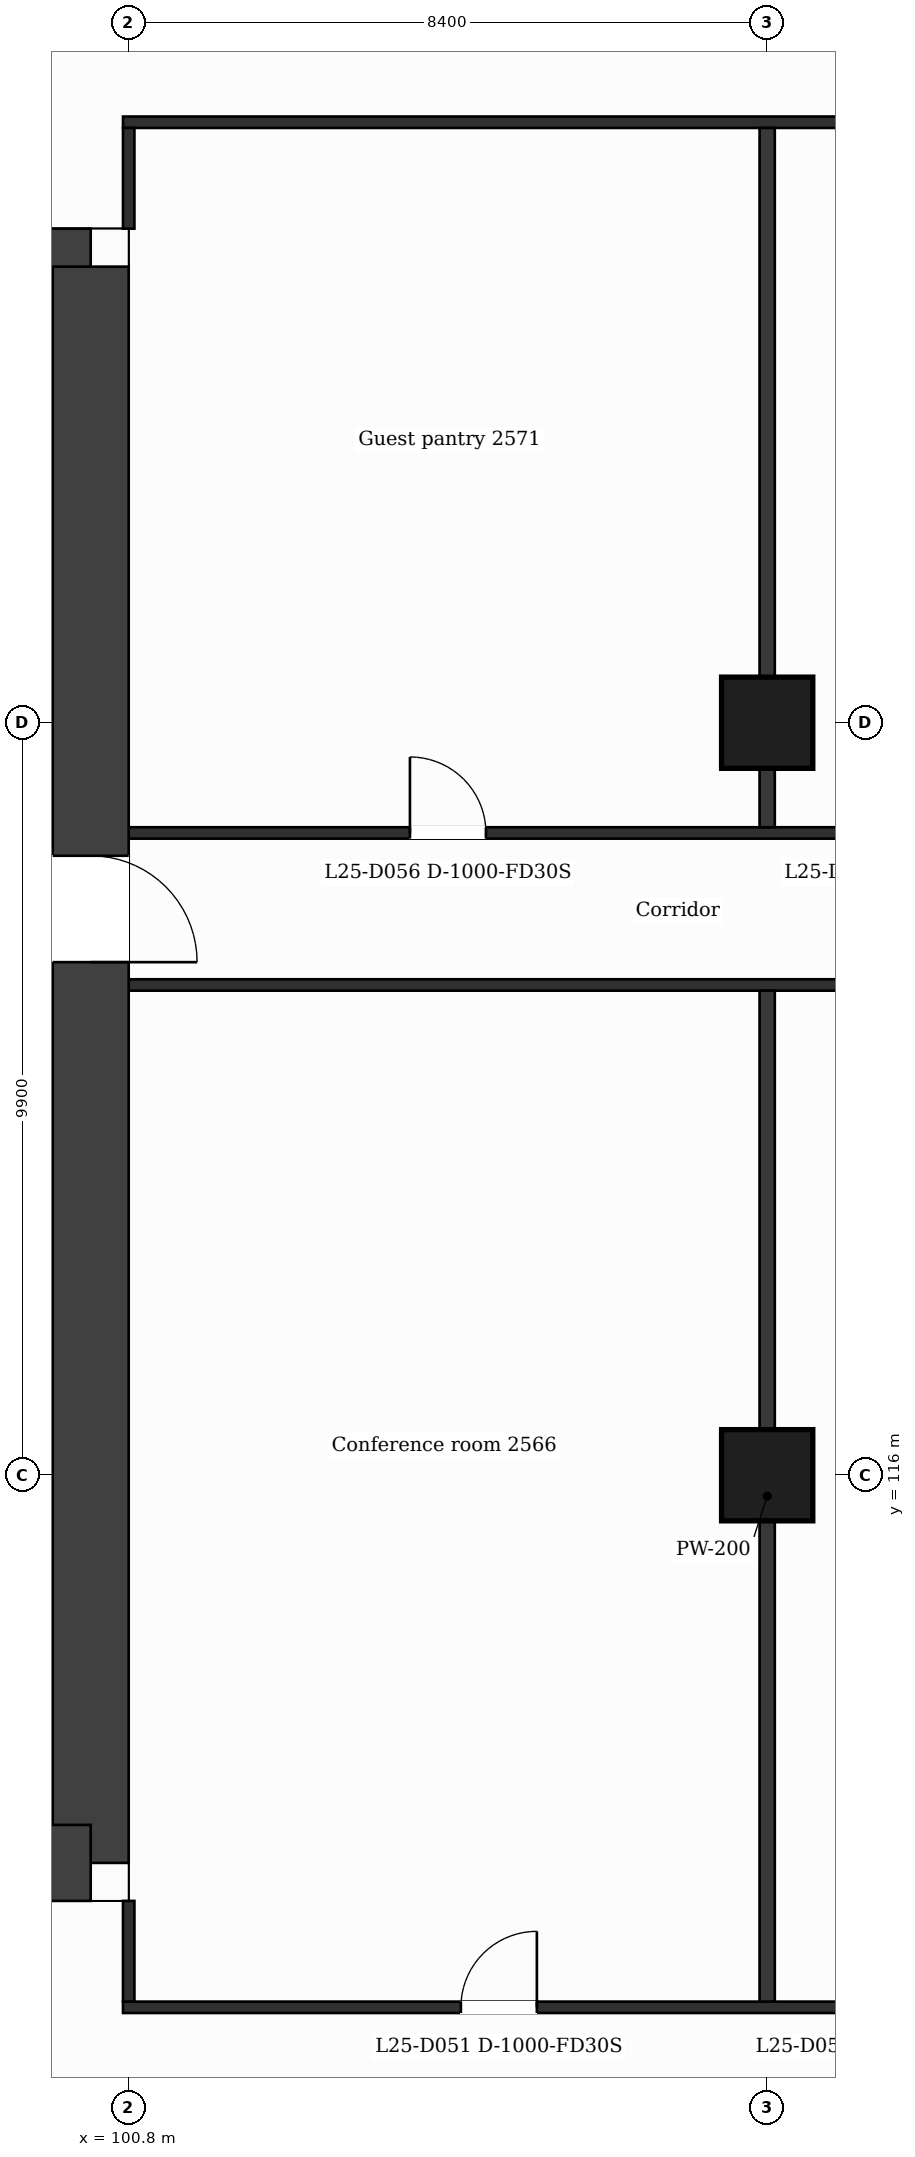
"""IFC4 building model, lengths in metres.
Left out: names, types, materials, properties, quantities, classifications, styles, units other than length and angle.
Written with IfcOpenShell. Run it as: python <this file> out.ifc"""

import sys

from ifc_helpers import new_model, si_unit, direction, frame, frame_2d, origin, origin_2d, place, context, subcontext, project, spatial, rectangle, extrude, element, fill, save


model = new_model("IFC4")
c1 = context("Model", 3, precision=1e-05, world=origin(), true_north=direction((0.0, 1.0)))
c2 = subcontext(c1, "Body", "Model", "MODEL_VIEW")
j1 = project(units=[si_unit("LENGTHUNIT", "METRE"), si_unit("PLANEANGLEUNIT", "RADIAN")], contexts=[c1])
p1 = place(None, origin())
s1 = spatial("IfcSite", under=j1, at=p1, CompositionType="ELEMENT")
p2 = place(p1, origin())
s2 = spatial("IfcBuilding", under=s1, at=p2, CompositionType="ELEMENT")
p3 = place(p2, frame((0.0, 0.0, 109.5)))
s3 = spatial("IfcBuildingStorey", under=s2, at=p3, CompositionType="ELEMENT", Elevation=109.5)
p4 = place(p3, frame((89.068, 131.9, 0.0), z_axis=(0.0, 0.0, 1.0), x_axis=(1.0, 0.0, 0.0)))
e1 = element("IfcWall", 1, at=p4, inside=s3, PredefinedType="SHEAR", context=c2, shape_type="SweptSolid", body=[
    extrude(rectangle(XDim=11.232, YDim=1.0, at=frame_2d((5.616, 0.0))), origin(), (0.0, 0.0, 1.0), 3.7),
])
p5 = place(p4, frame((6.646, 0.0, 0.0)))
e2 = element("IfcOpeningElement", 2, at=p5, cuts=e1, PredefinedType="OPENING", context=c2, shape_type="SweptSolid", body=[
    extrude(rectangle(XDim=1.2, YDim=2.1, at=frame_2d((0.6, 1.05))), frame((0.0, 0.51, 0.0), z_axis=(0.0, -1.0, 0.0), x_axis=(1.0, 0.0, 0.0)), (0.0, 0.0, 1.0), 1.02),
])
p6 = place(p3, frame((100.3, 131.9, 0.0), z_axis=(0.0, 0.0, 1.0), x_axis=(0.0, -1.0, 0.0)))
e3 = element("IfcWall", 3, at=p6, inside=s3, PredefinedType="SHEAR", context=c2, shape_type="SweptSolid", body=[
    extrude(rectangle(XDim=21.0, YDim=1.0, at=frame_2d((10.5, 0.0))), origin(), (0.0, 0.0, 1.0), 3.7),
])
p7 = place(p6, frame((7.75, 0.0, 0.0)))
e4 = element("IfcOpeningElement", 4, at=p7, cuts=e3, PredefinedType="OPENING", context=c2, shape_type="SweptSolid", body=[
    extrude(rectangle(XDim=1.4, YDim=2.1, at=frame_2d((0.7, 1.05))), frame((0.0, 0.51, 0.0), z_axis=(0.0, -1.0, 0.0), x_axis=(1.0, 0.0, 0.0)), (0.0, 0.0, 1.0), 1.02),
])
p8 = place(p3, frame((100.3, 110.9, 0.0), z_axis=(0.0, 0.0, 1.0), x_axis=(-1.0, 0.0, 0.0)))
e5 = element("IfcWall", 5, at=p8, inside=s3, PredefinedType="SHEAR", context=c2, shape_type="SweptSolid", body=[
    extrude(rectangle(XDim=14.059, YDim=1.0, at=frame_2d((7.03, 0.0))), origin(), (0.0, 0.0, 1.0), 3.7),
])
p9 = place(p8, frame((5.802, 0.0, 0.0)))
e6 = element("IfcOpeningElement", 6, at=p9, cuts=e5, PredefinedType="OPENING", context=c2, shape_type="SweptSolid", body=[
    extrude(rectangle(XDim=1.4, YDim=2.1, at=frame_2d((0.7, 1.05))), frame((0.0, 0.51, 0.0), z_axis=(0.0, -1.0, 0.0), x_axis=(1.0, 0.0, 0.0)), (0.0, 0.0, 1.0), 1.02),
])
p10 = place(p3, frame((94.9, 116.5, 0.0), z_axis=(0.0, 0.0, 1.0), x_axis=(1.0, 0.0, 0.0)))
e7 = element("IfcWall", 7, at=p10, inside=s3, PredefinedType="SHEAR", context=c2, shape_type="SweptSolid", body=[
    extrude(rectangle(XDim=4.9, YDim=1.0, at=frame_2d((2.45, 0.0))), origin(), (0.0, 0.0, 1.0), 3.7),
])
for number, where, z_axis, x_axis in (
    (8, (109.2, 116.0, 0.0), (0.0, 0.0, 1.0), (1.0, 0.0, 0.0)),
    (9, (109.2, 125.9, 0.0), (0.0, 0.0, 1.0), (1.0, 0.0, 0.0)),
):
    element("IfcColumn", number, at=place(p3, frame(where, z_axis=z_axis, x_axis=x_axis)), inside=s3, PredefinedType="COLUMN", context=c2, shape_type="SweptSolid", body=[
        extrude(rectangle(XDim=1.2, YDim=1.2, at=origin_2d()), origin(), (0.0, 0.0, 1.0), 3.7),
    ])
p11 = place(p3, frame((100.725, 109.0, 0.0), z_axis=(0.0, 0.0, 1.0), x_axis=(1.0, 0.0, 0.0)))
e10 = element("IfcWall", 10, at=p11, inside=s3, PredefinedType="PARTITIONING", context=c2, shape_type="SweptSolid", body=[
    extrude(rectangle(XDim=25.35, YDim=0.15, at=frame_2d((12.675, 0.0))), origin(), (0.0, 0.0, 1.0), 3.38),
])
p12 = place(p11, frame((4.445, 0.0, 0.0)))
e11 = element("IfcOpeningElement", 11, at=p12, cuts=e10, PredefinedType="OPENING", context=c2, shape_type="SweptSolid", body=[
    extrude(rectangle(XDim=1.0, YDim=2.1, at=frame_2d((0.5, 1.05))), frame((0.0, 0.085, 0.0), z_axis=(0.0, -1.0, 0.0), x_axis=(1.0, 0.0, 0.0)), (0.0, 0.0, 1.0), 0.17),
])
p13 = place(p11, frame((9.45, 0.0, 0.0)))
e12 = element("IfcOpeningElement", 12, at=p13, cuts=e10, PredefinedType="OPENING", context=c2, shape_type="SweptSolid", body=[
    extrude(rectangle(XDim=1.0, YDim=2.1, at=frame_2d((0.5, 1.05))), frame((0.0, 0.085, 0.0), z_axis=(0.0, -1.0, 0.0), x_axis=(1.0, 0.0, 0.0)), (0.0, 0.0, 1.0), 0.17),
])
p14 = place(p11, frame((13.65, 0.0, 0.0)))
e13 = element("IfcOpeningElement", 13, at=p14, cuts=e10, PredefinedType="OPENING", context=c2, shape_type="SweptSolid", body=[
    extrude(rectangle(XDim=1.0, YDim=2.1, at=frame_2d((0.5, 1.05))), frame((0.0, 0.085, 0.0), z_axis=(0.0, -1.0, 0.0), x_axis=(1.0, 0.0, 0.0)), (0.0, 0.0, 1.0), 0.17),
])
p15 = place(p11, frame((19.1, 0.0, 0.0)))
e14 = element("IfcOpeningElement", 14, at=p15, cuts=e10, PredefinedType="OPENING", context=c2, shape_type="SweptSolid", body=[
    extrude(rectangle(XDim=1.0, YDim=2.1, at=frame_2d((0.5, 1.05))), frame((0.0, 0.085, 0.0), z_axis=(0.0, -1.0, 0.0), x_axis=(1.0, 0.0, 0.0)), (0.0, 0.0, 1.0), 0.17),
])
p16 = place(p11, frame((22.05, 0.0, 0.0)))
e15 = element("IfcOpeningElement", 15, at=p16, cuts=e10, PredefinedType="OPENING", context=c2, shape_type="SweptSolid", body=[
    extrude(rectangle(XDim=1.0, YDim=2.1, at=frame_2d((0.5, 1.05))), frame((0.0, 0.085, 0.0), z_axis=(0.0, -1.0, 0.0), x_axis=(1.0, 0.0, 0.0)), (0.0, 0.0, 1.0), 0.17),
])
for number, where, z_axis, x_axis in (
    (16, (95.227, 117.2, 0.0), (0.0, 0.0, 1.0), (1.0, 0.0, 0.0)),
    (17, (95.227, 118.8, 0.0), (0.0, 0.0, 1.0), (1.0, 0.0, 0.0)),
):
    element("IfcWall", number, at=place(p3, frame(where, z_axis=z_axis, x_axis=x_axis)), inside=s3, PredefinedType="PARTITIONING", context=c2, shape_type="SweptSolid", body=[
        extrude(rectangle(XDim=4.573, YDim=0.2, at=frame_2d((2.287, 0.0))), origin(), (0.0, 0.0, 1.0), 3.38),
    ])
p17 = place(p3, frame((95.227, 122.1, 0.0), z_axis=(0.0, 0.0, 1.0), x_axis=(1.0, 0.0, 0.0)))
e18 = element("IfcWall", 18, at=p17, inside=s3, PredefinedType="PARTITIONING", context=c2, shape_type="SweptSolid", body=[
    extrude(rectangle(XDim=4.573, YDim=0.2, at=frame_2d((2.287, 0.0))), origin(), (0.0, 0.0, 1.0), 3.38),
])
p18 = place(p17, frame((0.693, 0.0, 0.0)))
e19 = element("IfcOpeningElement", 19, at=p18, cuts=e18, PredefinedType="OPENING", context=c2, shape_type="SweptSolid", body=[
    extrude(rectangle(XDim=0.9, YDim=2.1, at=frame_2d((0.45, 1.05))), frame((0.0, 0.11, 0.0), z_axis=(0.0, -1.0, 0.0), x_axis=(1.0, 0.0, 0.0)), (0.0, 0.0, 1.0), 0.22),
])
p19 = place(p17, frame((3.151, 0.0, 0.0)))
e20 = element("IfcOpeningElement", 20, at=p19, cuts=e18, PredefinedType="OPENING", context=c2, shape_type="SweptSolid", body=[
    extrude(rectangle(XDim=0.9, YDim=2.1, at=frame_2d((0.45, 1.05))), frame((0.0, 0.11, 0.0), z_axis=(0.0, -1.0, 0.0), x_axis=(1.0, 0.0, 0.0)), (0.0, 0.0, 1.0), 0.22),
])
p20 = place(p3, frame((100.8, 122.45, 0.0), z_axis=(0.0, 0.0, 1.0), x_axis=(1.0, 0.0, 0.0)))
e21 = element("IfcWall", 21, at=p20, inside=s3, PredefinedType="PARTITIONING", context=c2, shape_type="SweptSolid", body=[
    extrude(rectangle(XDim=25.2, YDim=0.15, at=frame_2d((12.6, 0.0))), origin(), (0.0, 0.0, 1.0), 3.38),
])
p21 = place(p3, frame((100.8, 124.45, 0.0), z_axis=(0.0, 0.0, 1.0), x_axis=(1.0, 0.0, 0.0)))
e22 = element("IfcWall", 22, at=p21, inside=s3, PredefinedType="PARTITIONING", context=c2, shape_type="SweptSolid", body=[
    extrude(rectangle(XDim=25.2, YDim=0.15, at=frame_2d((12.6, 0.0))), origin(), (0.0, 0.0, 1.0), 3.38),
])
p22 = place(p21, frame((3.7, 0.0, 0.0)))
e23 = element("IfcOpeningElement", 23, at=p22, cuts=e22, PredefinedType="OPENING", context=c2, shape_type="SweptSolid", body=[
    extrude(rectangle(XDim=1.0, YDim=2.1, at=frame_2d((0.5, 1.05))), frame((0.0, 0.085, 0.0), z_axis=(0.0, -1.0, 0.0), x_axis=(1.0, 0.0, 0.0)), (0.0, 0.0, 1.0), 0.17),
])
p23 = place(p21, frame((9.75, 0.0, 0.0)))
e24 = element("IfcOpeningElement", 24, at=p23, cuts=e22, PredefinedType="OPENING", context=c2, shape_type="SweptSolid", body=[
    extrude(rectangle(XDim=1.0, YDim=2.1, at=frame_2d((0.5, 1.05))), frame((0.0, 0.085, 0.0), z_axis=(0.0, -1.0, 0.0), x_axis=(1.0, 0.0, 0.0)), (0.0, 0.0, 1.0), 0.17),
])
p24 = place(p21, frame((13.575, 0.0, 0.0)))
e25 = element("IfcOpeningElement", 25, at=p24, cuts=e22, PredefinedType="OPENING", context=c2, shape_type="SweptSolid", body=[
    extrude(rectangle(XDim=1.0, YDim=2.1, at=frame_2d((0.5, 1.05))), frame((0.0, 0.085, 0.0), z_axis=(0.0, -1.0, 0.0), x_axis=(1.0, 0.0, 0.0)), (0.0, 0.0, 1.0), 0.17),
])
p25 = place(p21, frame((18.125, 0.0, 0.0)))
e26 = element("IfcOpeningElement", 26, at=p25, cuts=e22, PredefinedType="OPENING", context=c2, shape_type="SweptSolid", body=[
    extrude(rectangle(XDim=1.0, YDim=2.1, at=frame_2d((0.5, 1.05))), frame((0.0, 0.085, 0.0), z_axis=(0.0, -1.0, 0.0), x_axis=(1.0, 0.0, 0.0)), (0.0, 0.0, 1.0), 0.17),
])
p26 = place(p21, frame((22.35, 0.0, 0.0)))
e27 = element("IfcOpeningElement", 27, at=p26, cuts=e22, PredefinedType="OPENING", context=c2, shape_type="SweptSolid", body=[
    extrude(rectangle(XDim=1.0, YDim=2.1, at=frame_2d((0.5, 1.05))), frame((0.0, 0.085, 0.0), z_axis=(0.0, -1.0, 0.0), x_axis=(1.0, 0.0, 0.0)), (0.0, 0.0, 1.0), 0.17),
])
p27 = place(p3, frame((100.725, 133.8, 0.0), z_axis=(0.0, 0.0, 1.0), x_axis=(1.0, 0.0, 0.0)))
e28 = element("IfcWall", 28, at=p27, inside=s3, PredefinedType="PARTITIONING", context=c2, shape_type="SweptSolid", body=[
    extrude(rectangle(XDim=25.35, YDim=0.15, at=frame_2d((12.675, 0.0))), origin(), (0.0, 0.0, 1.0), 3.38),
])
p28 = place(p27, frame((18.225, 0.0, 0.0)))
e29 = element("IfcOpeningElement", 29, at=p28, cuts=e28, PredefinedType="OPENING", context=c2, shape_type="SweptSolid", body=[
    extrude(rectangle(XDim=1.0, YDim=2.1, at=frame_2d((0.5, 1.05))), frame((0.0, 0.085, 0.0), z_axis=(0.0, -1.0, 0.0), x_axis=(1.0, 0.0, 0.0)), (0.0, 0.0, 1.0), 0.17),
])
p29 = place(p3, frame((100.8, 109.075, 0.0), z_axis=(0.0, 0.0, 1.0), x_axis=(0.0, 1.0, 0.0)))
e30 = element("IfcWall", 30, at=p29, inside=s3, PredefinedType="PARTITIONING", context=c2, shape_type="SweptSolid", body=[
    extrude(rectangle(XDim=1.325, YDim=0.15, at=frame_2d((0.663, 0.0))), origin(), (0.0, 0.0, 1.0), 3.38),
])
p30 = place(p3, frame((100.8, 132.4, 0.0), z_axis=(0.0, 0.0, 1.0), x_axis=(0.0, 1.0, 0.0)))
e31 = element("IfcWall", 31, at=p30, inside=s3, PredefinedType="PARTITIONING", context=c2, shape_type="SweptSolid", body=[
    extrude(rectangle(XDim=1.325, YDim=0.15, at=frame_2d((0.663, 0.0))), origin(), (0.0, 0.0, 1.0), 3.38),
])
p31 = place(p3, frame((109.2, 109.075, 0.0), z_axis=(0.0, 0.0, 1.0), x_axis=(0.0, 1.0, 0.0)))
e32 = element("IfcWall", 32, at=p31, inside=s3, PredefinedType="PARTITIONING", context=c2, shape_type="SweptSolid", body=[
    extrude(rectangle(XDim=13.3, YDim=0.2, at=frame_2d((6.65, 0.0))), origin(), (0.0, 0.0, 1.0), 3.38),
])
p32 = place(p3, frame((109.2, 124.525, 0.0), z_axis=(0.0, 0.0, 1.0), x_axis=(0.0, 1.0, 0.0)))
e33 = element("IfcWall", 33, at=p32, inside=s3, PredefinedType="PARTITIONING", context=c2, shape_type="SweptSolid", body=[
    extrude(rectangle(XDim=9.2, YDim=0.2, at=frame_2d((4.6, 0.0))), origin(), (0.0, 0.0, 1.0), 3.38),
])
p33 = place(p12, origin())
e34 = element("IfcDoor", 34, at=p33, inside=s3, OperationType="SINGLE_SWING_RIGHT", PredefinedType="DOOR", context=c2, shape_type="SweptSolid", body=[
    extrude(rectangle(XDim=1.0, YDim=2.1, at=frame_2d((0.5, 1.05))), frame((0.0, 0.025, 0.0), z_axis=(0.0, -1.0, 0.0), x_axis=(1.0, 0.0, 0.0)), (0.0, 0.0, 1.0), 0.05),
])
fill(e11, e34)
p34 = place(p22, origin())
e35 = element("IfcDoor", 35, at=p34, inside=s3, OperationType="SINGLE_SWING_LEFT", PredefinedType="DOOR", context=c2, shape_type="SweptSolid", body=[
    extrude(rectangle(XDim=1.0, YDim=2.1, at=frame_2d((0.5, 1.05))), frame((0.0, 0.025, 0.0), z_axis=(0.0, -1.0, 0.0), x_axis=(1.0, 0.0, 0.0)), (0.0, 0.0, 1.0), 0.05),
])
fill(e23, e35)
p35 = place(p7, origin())
e36 = element("IfcDoor", 36, at=p35, inside=s3, OperationType="SINGLE_SWING_RIGHT", PredefinedType="DOOR", context=c2, shape_type="SweptSolid", body=[
    extrude(rectangle(XDim=1.4, YDim=2.1, at=frame_2d((0.7, 1.05))), frame((0.0, 0.025, 0.0), z_axis=(0.0, -1.0, 0.0), x_axis=(1.0, 0.0, 0.0)), (0.0, 0.0, 1.0), 0.05),
])
fill(e4, e36)
save(model, sys.argv[1])
